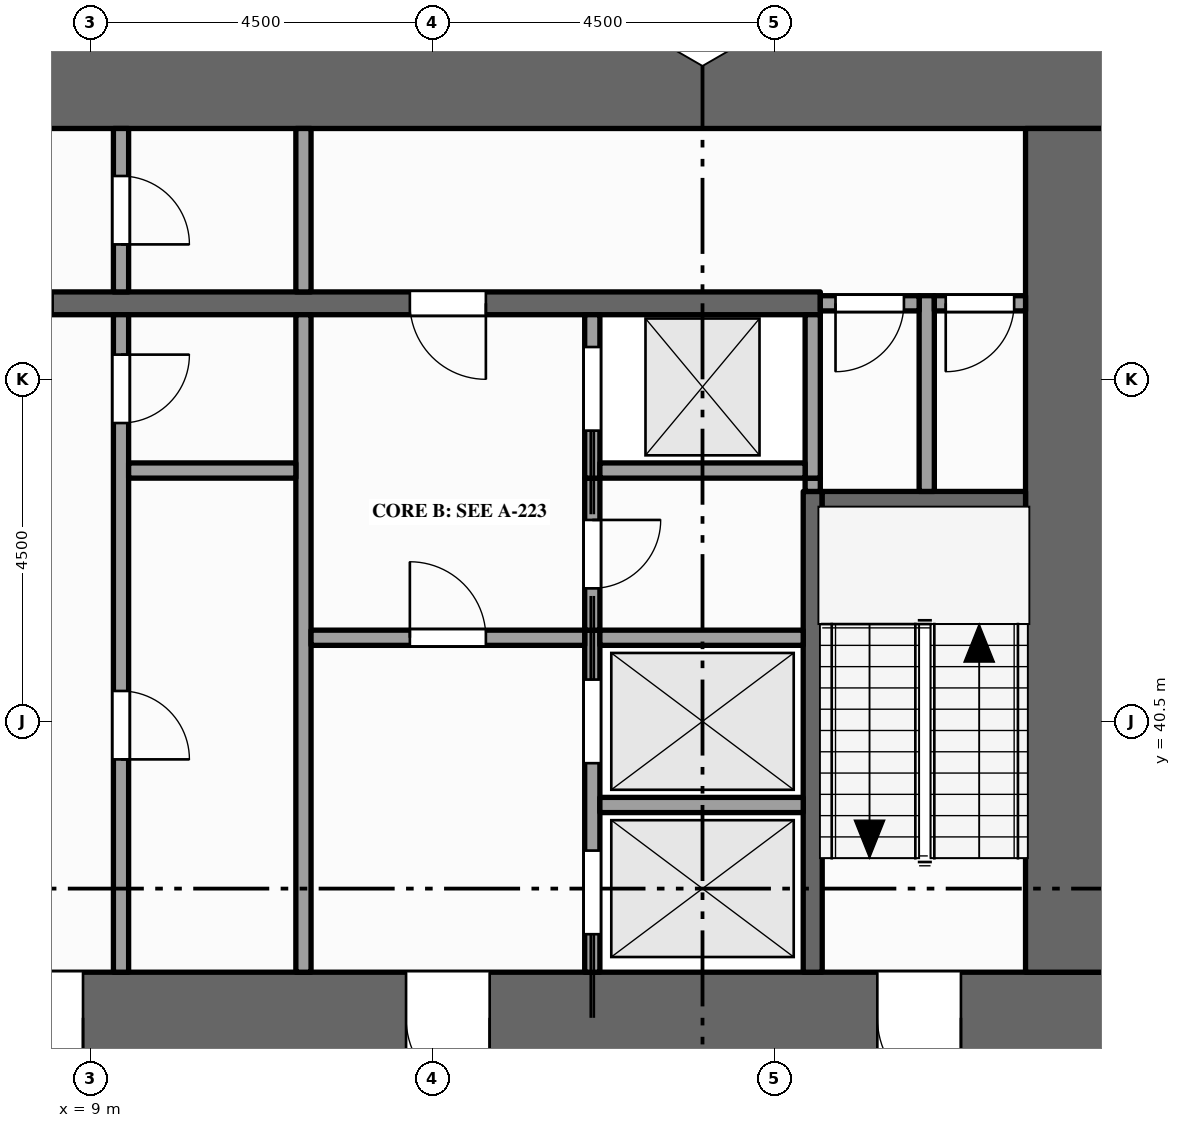
"""IFC4 building model, lengths in metres.
Left out: names, types, materials, properties, quantities, classifications, styles, units other than length and angle.
Written with IfcOpenShell. Run it as: python <this file> out.ifc"""

import sys

from ifc_helpers import new_model, si_unit, direction, frame, frame_2d, origin, place, context, subcontext, project, spatial, rectangle, extrude, element, fill, save


model = new_model("IFC4")
c1 = context("Model", 3, precision=1e-05, world=origin(), true_north=direction((0.0, 1.0)))
c2 = subcontext(c1, "Body", "Model", "MODEL_VIEW")
j1 = project(units=[si_unit("LENGTHUNIT", "METRE"), si_unit("PLANEANGLEUNIT", "RADIAN")], contexts=[c1])
p1 = place(None, origin())
s1 = spatial("IfcSite", under=j1, at=p1, CompositionType="ELEMENT")
p2 = place(p1, origin())
s2 = spatial("IfcBuilding", under=s1, at=p2, CompositionType="ELEMENT")
p3 = place(p2, frame((0.0, 0.0, 127.0)))
s3 = spatial("IfcBuildingStorey", under=s2, at=p3, CompositionType="ELEMENT", Elevation=127.0)
p4 = place(p3, frame((0.0, 36.6, -0.15), z_axis=(0.0, 0.0, 1.0), x_axis=(1.0, 0.0, 0.0)))
e1 = element("IfcWall", 1, at=p4, inside=s3, PredefinedType="SHEAR", context=c2, shape_type="SweptSolid", body=[
    extrude(rectangle(XDim=22.5, YDim=1.2, at=frame_2d((11.25, 0.0))), origin(), (0.0, 0.0, 1.0), 4.0),
])
p5 = place(p4, frame((7.1, 0.0, 0.15)))
e2 = element("IfcOpeningElement", 2, at=p5, cuts=e1, PredefinedType="OPENING", context=c2, shape_type="SweptSolid", body=[
    extrude(rectangle(XDim=1.8, YDim=2.1, at=frame_2d((0.9, 1.05))), frame((0.0, 0.61, 0.0), z_axis=(0.0, -1.0, 0.0), x_axis=(1.0, 0.0, 0.0)), (0.0, 0.0, 1.0), 1.22),
])
p6 = place(p4, frame((13.15, 0.0, 0.15)))
e3 = element("IfcOpeningElement", 3, at=p6, cuts=e1, PredefinedType="OPENING", context=c2, shape_type="SweptSolid", body=[
    extrude(rectangle(XDim=1.1, YDim=2.1, at=frame_2d((0.55, 1.05))), frame((0.0, 0.61, 0.0), z_axis=(0.0, -1.0, 0.0), x_axis=(1.0, 0.0, 0.0)), (0.0, 0.0, 1.0), 1.22),
])
p7 = place(p4, frame((2.15, 0.0, 0.15)))
e4 = element("IfcOpeningElement", 4, at=p7, cuts=e1, PredefinedType="OPENING", context=c2, shape_type="SweptSolid", body=[
    extrude(rectangle(XDim=1.1, YDim=2.1, at=frame_2d((0.55, 1.05))), frame((0.0, 0.61, 0.0), z_axis=(0.0, -1.0, 0.0), x_axis=(1.0, 0.0, 0.0)), (0.0, 0.0, 1.0), 1.22),
])
p8 = place(p4, frame((19.35, 0.0, 0.15)))
e5 = element("IfcOpeningElement", 5, at=p8, cuts=e1, PredefinedType="OPENING", context=c2, shape_type="SweptSolid", body=[
    extrude(rectangle(XDim=1.1, YDim=2.1, at=frame_2d((0.55, 1.05))), frame((0.0, 0.61, 0.0), z_axis=(0.0, -1.0, 0.0), x_axis=(1.0, 0.0, 0.0)), (0.0, 0.0, 1.0), 1.22),
])
p9 = place(p3, frame((0.0, 48.9, -0.15), z_axis=(0.0, 0.0, 1.0), x_axis=(1.0, 0.0, 0.0)))
e6 = element("IfcWall", 6, at=p9, inside=s3, PredefinedType="SHEAR", context=c2, shape_type="SweptSolid", body=[
    extrude(rectangle(XDim=22.5, YDim=1.2, at=frame_2d((11.25, 0.0))), origin(), (0.0, 0.0, 1.0), 4.0),
])
p10 = place(p3, frame((21.9, 37.2, -0.15), z_axis=(0.0, 0.0, 1.0), x_axis=(0.0, 1.0, 0.0)))
e7 = element("IfcWall", 7, at=p10, inside=s3, PredefinedType="SHEAR", context=c2, shape_type="SweptSolid", body=[
    extrude(rectangle(XDim=11.1, YDim=1.2, at=frame_2d((5.55, 0.0))), origin(), (0.0, 0.0, 1.0), 4.0),
])
p11 = place(p3, frame((9.4, 37.2, 0.0), z_axis=(0.0, 0.0, 1.0), x_axis=(0.0, 1.0, 0.0)))
e8 = element("IfcWall", 8, at=p11, inside=s3, PredefinedType="PARTITIONING", context=c2, shape_type="SweptSolid", body=[
    extrude(rectangle(XDim=8.65, YDim=0.2, at=frame_2d((4.325, 0.0))), origin(), (0.0, 0.0, 1.0), 3.75),
])
p12 = place(p11, frame((2.8, 0.0, 0.0)))
e9 = element("IfcOpeningElement", 9, at=p12, cuts=e8, PredefinedType="OPENING", context=c2, shape_type="SweptSolid", body=[
    extrude(rectangle(XDim=0.9, YDim=2.1, at=frame_2d((0.45, 1.05))), frame((0.0, 0.11, 0.0), z_axis=(0.0, -1.0, 0.0), x_axis=(1.0, 0.0, 0.0)), (0.0, 0.0, 1.0), 0.22),
])
p13 = place(p11, frame((7.225, 0.0, 0.0)))
e10 = element("IfcOpeningElement", 10, at=p13, cuts=e8, PredefinedType="OPENING", context=c2, shape_type="SweptSolid", body=[
    extrude(rectangle(XDim=0.9, YDim=2.1, at=frame_2d((0.45, 1.05))), frame((0.0, 0.11, 0.0), z_axis=(0.0, -1.0, 0.0), x_axis=(1.0, 0.0, 0.0)), (0.0, 0.0, 1.0), 0.22),
])
p14 = place(p3, frame((9.4, 46.15, 0.0), z_axis=(0.0, 0.0, 1.0), x_axis=(0.0, 1.0, 0.0)))
e11 = element("IfcWall", 11, at=p14, inside=s3, PredefinedType="PARTITIONING", context=c2, shape_type="SweptSolid", body=[
    extrude(rectangle(XDim=2.15, YDim=0.2, at=frame_2d((1.075, 0.0))), origin(), (0.0, 0.0, 1.0), 3.75),
])
p15 = place(p14, frame((0.625, 0.0, 0.0)))
e12 = element("IfcOpeningElement", 12, at=p15, cuts=e11, PredefinedType="OPENING", context=c2, shape_type="SweptSolid", body=[
    extrude(rectangle(XDim=0.9, YDim=2.1, at=frame_2d((0.45, 1.05))), frame((0.0, 0.11, 0.0), z_axis=(0.0, -1.0, 0.0), x_axis=(1.0, 0.0, 0.0)), (0.0, 0.0, 1.0), 0.22),
])
p16 = place(p3, frame((11.8, 37.2, 0.0), z_axis=(0.0, 0.0, 1.0), x_axis=(0.0, 1.0, 0.0)))
e13 = element("IfcWall", 13, at=p16, inside=s3, PredefinedType="PARTITIONING", context=c2, shape_type="SweptSolid", body=[
    extrude(rectangle(XDim=8.65, YDim=0.2, at=frame_2d((4.325, 0.0))), origin(), (0.0, 0.0, 1.0), 3.75),
])
p17 = place(p3, frame((11.8, 46.15, 0.0), z_axis=(0.0, 0.0, 1.0), x_axis=(0.0, 1.0, 0.0)))
e14 = element("IfcWall", 14, at=p17, inside=s3, PredefinedType="PARTITIONING", context=c2, shape_type="SweptSolid", body=[
    extrude(rectangle(XDim=2.15, YDim=0.2, at=frame_2d((1.075, 0.0))), origin(), (0.0, 0.0, 1.0), 3.75),
])
p18 = place(p3, frame((15.6, 37.2, 0.0), z_axis=(0.0, 0.0, 1.0), x_axis=(0.0, 1.0, 0.0)))
e15 = element("IfcWall", 15, at=p18, inside=s3, PredefinedType="SOLIDWALL", context=c2, shape_type="SweptSolid", body=[
    extrude(rectangle(XDim=4.5, YDim=0.2, at=frame_2d((2.25, 0.0))), origin(), (0.0, 0.0, 1.0), 3.75),
])
p19 = place(p18, frame((0.5, 0.0, 0.012)))
e16 = element("IfcOpeningElement", 16, at=p19, cuts=e15, PredefinedType="OPENING", context=c2, shape_type="SweptSolid", body=[
    extrude(rectangle(XDim=1.1, YDim=2.1, at=frame_2d((0.55, 1.05))), frame((0.0, 0.11, 0.0), z_axis=(0.0, -1.0, 0.0), x_axis=(1.0, 0.0, 0.0)), (0.0, 0.0, 1.0), 0.22),
])
p20 = place(p18, frame((2.75, 0.0, 0.012)))
e17 = element("IfcOpeningElement", 17, at=p20, cuts=e15, PredefinedType="OPENING", context=c2, shape_type="SweptSolid", body=[
    extrude(rectangle(XDim=1.1, YDim=2.1, at=frame_2d((0.55, 1.05))), frame((0.0, 0.11, 0.0), z_axis=(0.0, -1.0, 0.0), x_axis=(1.0, 0.0, 0.0)), (0.0, 0.0, 1.0), 0.22),
])
p21 = place(p3, frame((15.6, 41.7, 0.0), z_axis=(0.0, 0.0, 1.0), x_axis=(0.0, 1.0, 0.0)))
e18 = element("IfcWall", 18, at=p21, inside=s3, PredefinedType="PARTITIONING", context=c2, shape_type="SweptSolid", body=[
    extrude(rectangle(XDim=2.0, YDim=0.2, at=frame_2d((1.0, 0.0))), origin(), (0.0, 0.0, 1.0), 3.75),
])
p22 = place(p21, frame((0.55, 0.0, 0.0)))
e19 = element("IfcOpeningElement", 19, at=p22, cuts=e18, PredefinedType="OPENING", context=c2, shape_type="SweptSolid", body=[
    extrude(rectangle(XDim=0.9, YDim=2.1, at=frame_2d((0.45, 1.05))), frame((0.0, 0.11, 0.0), z_axis=(0.0, -1.0, 0.0), x_axis=(1.0, 0.0, 0.0)), (0.0, 0.0, 1.0), 0.22),
])
p23 = place(p3, frame((15.6, 43.7, 0.0), z_axis=(0.0, 0.0, 1.0), x_axis=(0.0, 1.0, 0.0)))
e20 = element("IfcWall", 20, at=p23, inside=s3, PredefinedType="SOLIDWALL", context=c2, shape_type="SweptSolid", body=[
    extrude(rectangle(XDim=2.15, YDim=0.2, at=frame_2d((1.075, 0.0))), origin(), (0.0, 0.0, 1.0), 3.75),
])
p24 = place(p23, frame((0.625, 0.0, 0.012)))
e21 = element("IfcOpeningElement", 21, at=p24, cuts=e20, PredefinedType="OPENING", context=c2, shape_type="SweptSolid", body=[
    extrude(rectangle(XDim=1.1, YDim=2.1, at=frame_2d((0.55, 1.05))), frame((0.0, 0.11, 0.0), z_axis=(0.0, -1.0, 0.0), x_axis=(1.0, 0.0, 0.0)), (0.0, 0.0, 1.0), 0.22),
])
p25 = place(p3, frame((18.5, 37.2, 0.0), z_axis=(0.0, 0.0, 1.0), x_axis=(0.0, 1.0, 0.0)))
e22 = element("IfcWall", 22, at=p25, inside=s3, PredefinedType="SHEAR", context=c2, shape_type="SweptSolid", body=[
    extrude(rectangle(XDim=6.325, YDim=0.25, at=frame_2d((3.163, 0.0))), origin(), (0.0, 0.0, 1.0), 3.75),
])
p26 = place(p3, frame((18.5, 43.525, 0.0), z_axis=(0.0, 0.0, 1.0), x_axis=(0.0, 1.0, 0.0)))
e23 = element("IfcWall", 23, at=p26, inside=s3, PredefinedType="PARTITIONING", context=c2, shape_type="SweptSolid", body=[
    extrude(rectangle(XDim=0.175, YDim=0.2, at=frame_2d((0.087, 0.0))), origin(), (0.0, 0.0, 1.0), 3.75),
])
p27 = place(p3, frame((18.5, 43.7, 0.0), z_axis=(0.0, 0.0, 1.0), x_axis=(0.0, 1.0, 0.0)))
e24 = element("IfcWall", 24, at=p27, inside=s3, PredefinedType="SOLIDWALL", context=c2, shape_type="SweptSolid", body=[
    extrude(rectangle(XDim=2.15, YDim=0.2, at=frame_2d((1.075, 0.0))), origin(), (0.0, 0.0, 1.0), 3.75),
])
p28 = place(p3, frame((20.0, 43.525, 0.0), z_axis=(0.0, 0.0, 1.0), x_axis=(0.0, 1.0, 0.0)))
e25 = element("IfcWall", 25, at=p28, inside=s3, PredefinedType="PARTITIONING", context=c2, shape_type="SweptSolid", body=[
    extrude(rectangle(XDim=2.575, YDim=0.2, at=frame_2d((1.288, 0.0))), origin(), (0.0, 0.0, 1.0), 3.75),
])
p29 = place(p3, frame((15.7, 39.4, 0.0), z_axis=(0.0, 0.0, 1.0), x_axis=(1.0, 0.0, 0.0)))
e26 = element("IfcWall", 26, at=p29, inside=s3, PredefinedType="SOLIDWALL", context=c2, shape_type="SweptSolid", body=[
    extrude(rectangle(XDim=2.675, YDim=0.2, at=frame_2d((1.337, 0.0))), origin(), (0.0, 0.0, 1.0), 3.75),
])
p30 = place(p3, frame((11.9, 41.6, 0.0), z_axis=(0.0, 0.0, 1.0), x_axis=(1.0, 0.0, 0.0)))
e27 = element("IfcWall", 27, at=p30, inside=s3, PredefinedType="PARTITIONING", context=c2, shape_type="SweptSolid", body=[
    extrude(rectangle(XDim=3.6, YDim=0.2, at=frame_2d((1.8, 0.0))), origin(), (0.0, 0.0, 1.0), 3.75),
])
p31 = place(p30, frame((1.3, 0.0, 0.0)))
e28 = element("IfcOpeningElement", 28, at=p31, cuts=e27, PredefinedType="OPENING", context=c2, shape_type="SweptSolid", body=[
    extrude(rectangle(XDim=1.0, YDim=2.1, at=frame_2d((0.5, 1.05))), frame((0.0, 0.11, 0.0), z_axis=(0.0, -1.0, 0.0), x_axis=(1.0, 0.0, 0.0)), (0.0, 0.0, 1.0), 0.22),
])
p32 = place(p3, frame((15.7, 41.6, 0.0), z_axis=(0.0, 0.0, 1.0), x_axis=(1.0, 0.0, 0.0)))
e29 = element("IfcWall", 29, at=p32, inside=s3, PredefinedType="SOLIDWALL", context=c2, shape_type="SweptSolid", body=[
    extrude(rectangle(XDim=2.675, YDim=0.2, at=frame_2d((1.337, 0.0))), origin(), (0.0, 0.0, 1.0), 3.75),
])
p33 = place(p3, frame((18.625, 43.4, 0.0), z_axis=(0.0, 0.0, 1.0), x_axis=(1.0, 0.0, 0.0)))
e30 = element("IfcWall", 30, at=p33, inside=s3, PredefinedType="SHEAR", context=c2, shape_type="SweptSolid", body=[
    extrude(rectangle(XDim=2.675, YDim=0.25, at=frame_2d((1.337, 0.0))), origin(), (0.0, 0.0, 1.0), 3.75),
])
p34 = place(p3, frame((9.5, 43.8, 0.0), z_axis=(0.0, 0.0, 1.0), x_axis=(1.0, 0.0, 0.0)))
e31 = element("IfcWall", 31, at=p34, inside=s3, PredefinedType="PARTITIONING", context=c2, shape_type="SweptSolid", body=[
    extrude(rectangle(XDim=2.2, YDim=0.2, at=frame_2d((1.1, 0.0))), origin(), (0.0, 0.0, 1.0), 3.75),
])
p35 = place(p3, frame((15.7, 43.8, 0.0), z_axis=(0.0, 0.0, 1.0), x_axis=(1.0, 0.0, 0.0)))
e32 = element("IfcWall", 32, at=p35, inside=s3, PredefinedType="SOLIDWALL", context=c2, shape_type="SweptSolid", body=[
    extrude(rectangle(XDim=2.7, YDim=0.2, at=frame_2d((1.35, 0.0))), origin(), (0.0, 0.0, 1.0), 3.75),
])
p36 = place(p3, frame((4.1, 46.0, 0.0), z_axis=(0.0, 0.0, 1.0), x_axis=(1.0, 0.0, 0.0)))
e33 = element("IfcWall", 33, at=p36, inside=s3, PredefinedType="SHEAR", context=c2, shape_type="SweptSolid", body=[
    extrude(rectangle(XDim=14.5, YDim=0.3, at=frame_2d((7.25, 0.0))), origin(), (0.0, 0.0, 1.0), 3.75),
])
p37 = place(p36, frame((3.4, 0.0, 0.0)))
e34 = element("IfcOpeningElement", 34, at=p37, cuts=e33, PredefinedType="OPENING", context=c2, shape_type="SweptSolid", body=[
    extrude(rectangle(XDim=1.0, YDim=2.1, at=frame_2d((0.5, 1.05))), frame((0.0, 0.16, 0.0), z_axis=(0.0, -1.0, 0.0), x_axis=(1.0, 0.0, 0.0)), (0.0, 0.0, 1.0), 0.32),
])
p38 = place(p36, frame((9.1, 0.0, 0.0)))
e35 = element("IfcOpeningElement", 35, at=p38, cuts=e33, PredefinedType="OPENING", context=c2, shape_type="SweptSolid", body=[
    extrude(rectangle(XDim=1.0, YDim=2.1, at=frame_2d((0.5, 1.05))), frame((0.0, 0.16, 0.0), z_axis=(0.0, -1.0, 0.0), x_axis=(1.0, 0.0, 0.0)), (0.0, 0.0, 1.0), 0.32),
])
p39 = place(p3, frame((18.6, 46.0, 0.0), z_axis=(0.0, 0.0, 1.0), x_axis=(1.0, 0.0, 0.0)))
e36 = element("IfcWall", 36, at=p39, inside=s3, PredefinedType="PARTITIONING", context=c2, shape_type="SweptSolid", body=[
    extrude(rectangle(XDim=1.3, YDim=0.2, at=frame_2d((0.65, 0.0))), origin(), (0.0, 0.0, 1.0), 3.75),
])
p40 = place(p39, frame((0.2, 0.0, 0.0)))
e37 = element("IfcOpeningElement", 37, at=p40, cuts=e36, PredefinedType="OPENING", context=c2, shape_type="SweptSolid", body=[
    extrude(rectangle(XDim=0.9, YDim=2.1, at=frame_2d((0.45, 1.05))), frame((0.0, 0.11, 0.0), z_axis=(0.0, -1.0, 0.0), x_axis=(1.0, 0.0, 0.0)), (0.0, 0.0, 1.0), 0.22),
])
p41 = place(p3, frame((20.1, 46.0, 0.0), z_axis=(0.0, 0.0, 1.0), x_axis=(1.0, 0.0, 0.0)))
e38 = element("IfcWall", 38, at=p41, inside=s3, PredefinedType="PARTITIONING", context=c2, shape_type="SweptSolid", body=[
    extrude(rectangle(XDim=1.2, YDim=0.2, at=frame_2d((0.6, 0.0))), origin(), (0.0, 0.0, 1.0), 3.75),
])
p42 = place(p41, frame((0.15, 0.0, 0.0)))
e39 = element("IfcOpeningElement", 39, at=p42, cuts=e38, PredefinedType="OPENING", context=c2, shape_type="SweptSolid", body=[
    extrude(rectangle(XDim=0.9, YDim=2.1, at=frame_2d((0.45, 1.05))), frame((0.0, 0.11, 0.0), z_axis=(0.0, -1.0, 0.0), x_axis=(1.0, 0.0, 0.0)), (0.0, 0.0, 1.0), 0.22),
])
p43 = place(p19, origin())
e40 = element("IfcDoor", 40, at=p43, inside=s3, OperationType="SLIDING_TO_LEFT", PredefinedType="DOOR", context=c2, shape_type="SweptSolid", body=[
    extrude(rectangle(XDim=1.1, YDim=2.1, at=frame_2d((0.55, 1.05))), frame((0.0, 0.025, 0.0), z_axis=(0.0, -1.0, 0.0), x_axis=(1.0, 0.0, 0.0)), (0.0, 0.0, 1.0), 0.05),
])
fill(e16, e40)
p44 = place(p20, origin())
e41 = element("IfcDoor", 41, at=p44, inside=s3, OperationType="SLIDING_TO_RIGHT", PredefinedType="DOOR", context=c2, shape_type="SweptSolid", body=[
    extrude(rectangle(XDim=1.1, YDim=2.1, at=frame_2d((0.55, 1.05))), frame((0.0, 0.025, 0.0), z_axis=(0.0, -1.0, 0.0), x_axis=(1.0, 0.0, 0.0)), (0.0, 0.0, 1.0), 0.05),
])
fill(e17, e41)
p45 = place(p24, origin())
e42 = element("IfcDoor", 42, at=p45, inside=s3, OperationType="SLIDING_TO_LEFT", PredefinedType="DOOR", context=c2, shape_type="SweptSolid", body=[
    extrude(rectangle(XDim=1.1, YDim=2.1, at=frame_2d((0.55, 1.05))), frame((0.0, 0.025, 0.0), z_axis=(0.0, -1.0, 0.0), x_axis=(1.0, 0.0, 0.0)), (0.0, 0.0, 1.0), 0.05),
])
fill(e21, e42)
p46 = place(p5, origin())
e43 = element("IfcDoor", 43, at=p46, inside=s3, OperationType="DOUBLE_DOOR_SINGLE_SWING", PredefinedType="DOOR", context=c2, shape_type="SweptSolid", body=[
    extrude(rectangle(XDim=1.8, YDim=2.1, at=frame_2d((0.9, 1.05))), frame((0.0, 0.025, 0.0), z_axis=(0.0, -1.0, 0.0), x_axis=(1.0, 0.0, 0.0)), (0.0, 0.0, 1.0), 0.05),
])
fill(e2, e43)
p47 = place(p6, origin())
e44 = element("IfcDoor", 44, at=p47, inside=s3, OperationType="SINGLE_SWING_RIGHT", PredefinedType="DOOR", context=c2, shape_type="SweptSolid", body=[
    extrude(rectangle(XDim=1.1, YDim=2.1, at=frame_2d((0.55, 1.05))), frame((0.0, 0.025, 0.0), z_axis=(0.0, -1.0, 0.0), x_axis=(1.0, 0.0, 0.0)), (0.0, 0.0, 1.0), 0.05),
])
fill(e3, e44)
p48 = place(p31, origin())
e45 = element("IfcDoor", 45, at=p48, inside=s3, OperationType="SINGLE_SWING_LEFT", PredefinedType="DOOR", context=c2, shape_type="SweptSolid", body=[
    extrude(rectangle(XDim=1.0, YDim=2.1, at=frame_2d((0.5, 1.05))), frame((0.0, 0.025, 0.0), z_axis=(0.0, -1.0, 0.0), x_axis=(1.0, 0.0, 0.0)), (0.0, 0.0, 1.0), 0.05),
])
fill(e28, e45)
p49 = place(p38, origin())
e46 = element("IfcDoor", 46, at=p49, inside=s3, OperationType="SINGLE_SWING_RIGHT", PredefinedType="DOOR", context=c2, shape_type="SweptSolid", body=[
    extrude(rectangle(XDim=1.0, YDim=2.1, at=frame_2d((0.5, 1.05))), frame((0.0, 0.025, 0.0), z_axis=(0.0, -1.0, 0.0), x_axis=(1.0, 0.0, 0.0)), (0.0, 0.0, 1.0), 0.05),
])
fill(e35, e46)
p50 = place(p15, origin())
e47 = element("IfcDoor", 47, at=p50, inside=s3, OperationType="SINGLE_SWING_LEFT", PredefinedType="DOOR", context=c2, shape_type="SweptSolid", body=[
    extrude(rectangle(XDim=0.9, YDim=2.1, at=frame_2d((0.45, 1.05))), frame((0.0, 0.025, 0.0), z_axis=(0.0, -1.0, 0.0), x_axis=(1.0, 0.0, 0.0)), (0.0, 0.0, 1.0), 0.05),
])
fill(e12, e47)
p51 = place(p8, origin())
e48 = element("IfcDoor", 48, at=p51, inside=s3, OperationType="SINGLE_SWING_RIGHT", PredefinedType="DOOR", context=c2, shape_type="SweptSolid", body=[
    extrude(rectangle(XDim=1.1, YDim=2.1, at=frame_2d((0.55, 1.05))), frame((0.0, 0.025, 0.0), z_axis=(0.0, -1.0, 0.0), x_axis=(1.0, 0.0, 0.0)), (0.0, 0.0, 1.0), 0.05),
])
fill(e5, e48)
p52 = place(p40, origin())
e49 = element("IfcDoor", 49, at=p52, inside=s3, OperationType="SINGLE_SWING_LEFT", PredefinedType="DOOR", context=c2, shape_type="SweptSolid", body=[
    extrude(rectangle(XDim=0.9, YDim=2.1, at=frame_2d((0.45, 1.05))), frame((0.0, 0.025, 0.0), z_axis=(0.0, -1.0, 0.0), x_axis=(1.0, 0.0, 0.0)), (0.0, 0.0, 1.0), 0.05),
])
fill(e37, e49)
p53 = place(p42, origin())
e50 = element("IfcDoor", 50, at=p53, inside=s3, OperationType="SINGLE_SWING_LEFT", PredefinedType="DOOR", context=c2, shape_type="SweptSolid", body=[
    extrude(rectangle(XDim=0.9, YDim=2.1, at=frame_2d((0.45, 1.05))), frame((0.0, 0.025, 0.0), z_axis=(0.0, -1.0, 0.0), x_axis=(1.0, 0.0, 0.0)), (0.0, 0.0, 1.0), 0.05),
])
fill(e39, e50)
p54 = place(p12, origin())
e51 = element("IfcDoor", 51, at=p54, inside=s3, OperationType="SINGLE_SWING_LEFT", PredefinedType="DOOR", context=c2, shape_type="SweptSolid", body=[
    extrude(rectangle(XDim=0.9, YDim=2.1, at=frame_2d((0.45, 1.05))), frame((0.0, 0.025, 0.0), z_axis=(0.0, -1.0, 0.0), x_axis=(1.0, 0.0, 0.0)), (0.0, 0.0, 1.0), 0.05),
])
fill(e9, e51)
p55 = place(p13, origin())
e52 = element("IfcDoor", 52, at=p55, inside=s3, OperationType="SINGLE_SWING_RIGHT", PredefinedType="DOOR", context=c2, shape_type="SweptSolid", body=[
    extrude(rectangle(XDim=0.9, YDim=2.1, at=frame_2d((0.45, 1.05))), frame((0.0, 0.025, 0.0), z_axis=(0.0, -1.0, 0.0), x_axis=(1.0, 0.0, 0.0)), (0.0, 0.0, 1.0), 0.05),
])
fill(e10, e52)
p56 = place(p22, origin())
e53 = element("IfcDoor", 53, at=p56, inside=s3, OperationType="SINGLE_SWING_RIGHT", PredefinedType="DOOR", context=c2, shape_type="SweptSolid", body=[
    extrude(rectangle(XDim=0.9, YDim=2.1, at=frame_2d((0.45, 1.05))), frame((0.0, 0.025, 0.0), z_axis=(0.0, -1.0, 0.0), x_axis=(1.0, 0.0, 0.0)), (0.0, 0.0, 1.0), 0.05),
])
fill(e19, e53)
save(model, sys.argv[1])
